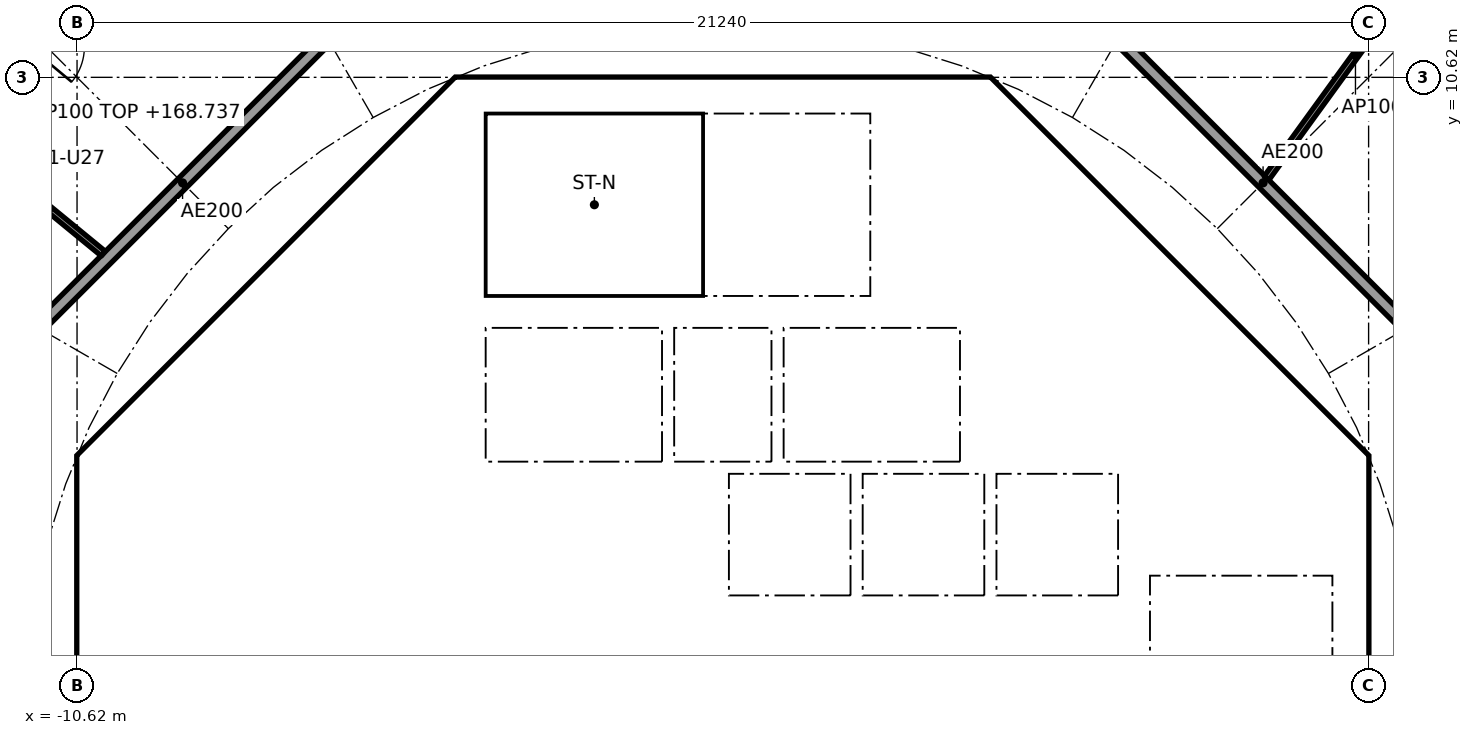
"""IFC4 building model, lengths in metres.
Left out: names, types, materials, properties, quantities, classifications, styles, units other than length and angle.
Written with IfcOpenShell. Run it as: python <this file> out.ifc"""

import sys

from ifc_helpers import new_model, si_unit, direction, frame, frame_2d, origin, place, context, subcontext, project, spatial, polyline, rectangle, outline, extrude, element, fill, save


model = new_model("IFC4")
c1 = context("Model", 3, precision=1e-05, world=origin(), true_north=direction((0.0, 1.0)))
c2 = subcontext(c1, "Body", "Model", "MODEL_VIEW")
j1 = project(units=[si_unit("LENGTHUNIT", "METRE"), si_unit("PLANEANGLEUNIT", "RADIAN")], contexts=[c1])
p1 = place(None, origin())
s1 = spatial("IfcSite", under=j1, at=p1, CompositionType="ELEMENT")
p2 = place(p1, origin())
s2 = spatial("IfcBuilding", under=s1, at=p2, CompositionType="ELEMENT")
p3 = place(p2, frame((0.0, 0.0, 165.9)))
s3 = spatial("IfcBuildingStorey", under=s2, at=p3, CompositionType="ELEMENT", Elevation=165.9)
p4 = place(p3, frame((9.988, 4.613, 0.0), z_axis=(0.0, 0.0, 1.0), x_axis=(-0.707106781187, 0.707106781187, 0.0)))
e1 = element("IfcWall", 1, at=p4, inside=s3, PredefinedType="SHEAR", context=c2, shape_type="SweptSolid", body=[
    extrude(rectangle(XDim=7.602, YDim=0.6, at=frame_2d((3.801, 0.0))), origin(), (0.0, 0.0, 1.0), 3.44),
])
p5 = place(p4, frame((3.201, 0.0, 0.0)))
e2 = element("IfcOpeningElement", 2, at=p5, cuts=e1, PredefinedType="OPENING", context=c2, shape_type="SweptSolid", body=[
    extrude(rectangle(XDim=1.2, YDim=2.1, at=frame_2d((0.6, 1.05))), frame((0.0, 0.31, 0.0), z_axis=(0.0, -1.0, 0.0), x_axis=(1.0, 0.0, 0.0)), (0.0, 0.0, 1.0), 0.62),
])
p6 = place(p3, frame((-4.613, 9.988, 0.0), z_axis=(0.0, 0.0, 1.0), x_axis=(-0.707106781187, -0.707106781187, 0.0)))
e3 = element("IfcWall", 3, at=p6, inside=s3, PredefinedType="SHEAR", context=c2, shape_type="SweptSolid", body=[
    extrude(rectangle(XDim=7.602, YDim=0.6, at=frame_2d((3.801, 0.0))), origin(), (0.0, 0.0, 1.0), 3.44),
])
p7 = place(p6, frame((0.351, 0.0, 0.0)))
e4 = element("IfcOpeningElement", 4, at=p7, cuts=e3, PredefinedType="OPENING", context=c2, shape_type="SweptSolid", body=[
    extrude(rectangle(XDim=1.1, YDim=2.1, at=frame_2d((0.55, 1.05))), frame((0.0, 0.31, 0.0), z_axis=(0.0, -1.0, 0.0), x_axis=(1.0, 0.0, 0.0)), (0.0, 0.0, 1.0), 0.62),
])
p8 = place(p3, frame((-10.325, 3.801, 0.0), z_axis=(0.0, 0.0, 1.0), x_axis=(0.0, -1.0, 0.0)))
e5 = element("IfcWall", 5, at=p8, inside=s3, PredefinedType="SHEAR", context=c2, shape_type="SweptSolid", body=[
    extrude(rectangle(XDim=7.602, YDim=0.6, at=frame_2d((3.801, 0.0))), origin(), (0.0, 0.0, 1.0), 3.44),
])
p9 = place(p8, frame((0.651, 0.0, 0.0)))
e6 = element("IfcOpeningElement", 6, at=p9, cuts=e5, PredefinedType="OPENING", context=c2, shape_type="SweptSolid", body=[
    extrude(rectangle(XDim=1.5, YDim=2.1, at=frame_2d((0.75, 1.05))), frame((0.0, 0.31, 0.0), z_axis=(0.0, -1.0, 0.0), x_axis=(1.0, 0.0, 0.0)), (0.0, 0.0, 1.0), 0.62),
])
p10 = place(p8, frame((5.451, 0.0, 0.0)))
e7 = element("IfcOpeningElement", 7, at=p10, cuts=e5, PredefinedType="OPENING", context=c2, shape_type="SweptSolid", body=[
    extrude(rectangle(XDim=1.5, YDim=2.1, at=frame_2d((0.75, 1.05))), frame((0.0, 0.31, 0.0), z_axis=(0.0, -1.0, 0.0), x_axis=(1.0, 0.0, 0.0)), (0.0, 0.0, 1.0), 0.62),
])
p11 = place(p3, frame((-5.8, 4.3, 0.0), z_axis=(0.0, 0.0, 1.0), x_axis=(0.0, 1.0, 0.0)))
e8 = element("IfcWall", 8, at=p11, inside=s3, PredefinedType="PARTITIONING", context=c2, shape_type="SweptSolid", body=[
    extrude(rectangle(XDim=3.927, YDim=0.15, at=frame_2d((1.963, 0.0))), origin(), (0.0, 0.0, 1.0), 3.44),
])
p12 = place(p11, frame((1.551, 0.0, 0.0)))
e9 = element("IfcOpeningElement", 9, at=p12, cuts=e8, PredefinedType="OPENING", context=c2, shape_type="SweptSolid", body=[
    extrude(rectangle(XDim=0.9, YDim=2.1, at=frame_2d((0.45, 1.05))), frame((0.0, 0.085, 0.0), z_axis=(0.0, -1.0, 0.0), x_axis=(1.0, 0.0, 0.0)), (0.0, 0.0, 1.0), 0.17),
])
p13 = place(p3, frame((4.0, 4.3, 0.0), z_axis=(0.0, 0.0, 1.0), x_axis=(0.0, 1.0, 0.0)))
e10 = element("IfcWall", 10, at=p13, inside=s3, PredefinedType="SOLIDWALL", context=c2, shape_type="SweptSolid", body=[
    extrude(rectangle(XDim=2.2, YDim=0.2, at=frame_2d((1.1, 0.0))), origin(), (0.0, 0.0, 1.0), 3.44),
])
p14 = place(p13, frame((0.55, 0.0, 0.0)))
e11 = element("IfcOpeningElement", 11, at=p14, cuts=e10, PredefinedType="OPENING", context=c2, shape_type="SweptSolid", body=[
    extrude(rectangle(XDim=1.1, YDim=2.1, at=frame_2d((0.55, 1.05))), frame((0.0, 0.11, 0.0), z_axis=(0.0, -1.0, 0.0), x_axis=(1.0, 0.0, 0.0)), (0.0, 0.0, 1.0), 0.22),
])
p15 = place(p3, frame((-4.0, 4.3, 0.0), z_axis=(0.0, 0.0, 1.0), x_axis=(0.0, 1.0, 0.0)))
e12 = element("IfcWall", 12, at=p15, inside=s3, PredefinedType="SOLIDWALL", context=c2, shape_type="SweptSolid", body=[
    extrude(rectangle(XDim=2.2, YDim=0.2, at=frame_2d((1.1, 0.0))), origin(), (0.0, 0.0, 1.0), 3.44),
])
p16 = place(p15, frame((0.55, 0.0, 0.0)))
e13 = element("IfcOpeningElement", 13, at=p16, cuts=e12, PredefinedType="OPENING", context=c2, shape_type="SweptSolid", body=[
    extrude(rectangle(XDim=1.1, YDim=2.1, at=frame_2d((0.55, 1.05))), frame((0.0, 0.11, 0.0), z_axis=(0.0, -1.0, 0.0), x_axis=(1.0, 0.0, 0.0)), (0.0, 0.0, 1.0), 0.22),
])
p17 = place(p3, frame((-6.7, 2.0, 0.0), z_axis=(0.0, 0.0, 1.0), x_axis=(1.0, 0.0, 0.0)))
e14 = element("IfcWall", 14, at=p17, inside=s3, PredefinedType="SOLIDWALL", context=c2, shape_type="SweptSolid", body=[
    extrude(rectangle(XDim=13.4, YDim=0.2, at=frame_2d((6.7, 0.0))), origin(), (0.0, 0.0, 1.0), 3.44),
])
p18 = place(p17, frame((7.25, 0.0, 0.0)))
e15 = element("IfcOpeningElement", 15, at=p18, cuts=e14, PredefinedType="OPENING", context=c2, shape_type="SweptSolid", body=[
    extrude(rectangle(XDim=1.1, YDim=2.1, at=frame_2d((0.55, 1.05))), frame((0.0, 0.11, 0.0), z_axis=(0.0, -1.0, 0.0), x_axis=(1.0, 0.0, 0.0)), (0.0, 0.0, 1.0), 0.22),
])
p19 = place(p17, frame((9.45, 0.0, 0.0)))
e16 = element("IfcOpeningElement", 16, at=p19, cuts=e14, PredefinedType="OPENING", context=c2, shape_type="SweptSolid", body=[
    extrude(rectangle(XDim=1.1, YDim=2.1, at=frame_2d((0.55, 1.05))), frame((0.0, 0.11, 0.0), z_axis=(0.0, -1.0, 0.0), x_axis=(1.0, 0.0, 0.0)), (0.0, 0.0, 1.0), 0.22),
])
p20 = place(p17, frame((2.95, 0.0, 0.0)))
e17 = element("IfcOpeningElement", 17, at=p20, cuts=e14, PredefinedType="OPENING", context=c2, shape_type="SweptSolid", body=[
    extrude(rectangle(XDim=0.9, YDim=2.1, at=frame_2d((0.45, 1.05))), frame((0.0, 0.11, 0.0), z_axis=(0.0, -1.0, 0.0), x_axis=(1.0, 0.0, 0.0)), (0.0, 0.0, 1.0), 0.22),
])
p21 = place(p3, frame((6.7, 4.0, 0.0), z_axis=(0.0, 0.0, 1.0), x_axis=(1.0, 0.0, 0.0)))
e18 = element("IfcWall", 18, at=p21, inside=s3, PredefinedType="SOLIDWALL", context=c2, shape_type="SweptSolid", body=[
    extrude(rectangle(XDim=3.325, YDim=0.2, at=frame_2d((1.662, 0.0))), origin(), (0.0, 0.0, 1.0), 3.44),
])
p22 = place(p21, frame((1.25, 0.0, 0.0)))
e19 = element("IfcOpeningElement", 19, at=p22, cuts=e18, PredefinedType="OPENING", context=c2, shape_type="SweptSolid", body=[
    extrude(rectangle(XDim=1.1, YDim=2.1, at=frame_2d((0.55, 1.05))), frame((0.0, 0.11, 0.0), z_axis=(0.0, -1.0, 0.0), x_axis=(1.0, 0.0, 0.0)), (0.0, 0.0, 1.0), 0.22),
])
p23 = place(p3, frame((4.0, 7.025, 0.0), z_axis=(0.0, 0.0, 1.0), x_axis=(0.0, 1.0, 0.0)))
e20 = element("IfcWall", 20, at=p23, inside=s3, PredefinedType="SOLIDWALL", context=c2, shape_type="SweptSolid", body=[
    extrude(rectangle(XDim=3.0, YDim=0.2, at=frame_2d((1.5, 0.0))), origin(), (0.0, 0.0, 1.0), 3.44),
])
p24 = place(p23, frame((0.925, 0.0, 0.0)))
e21 = element("IfcOpeningElement", 21, at=p24, cuts=e20, PredefinedType="OPENING", context=c2, shape_type="SweptSolid", body=[
    extrude(rectangle(XDim=1.1, YDim=2.1, at=frame_2d((0.55, 1.05))), frame((0.0, 0.11, 0.0), z_axis=(0.0, -1.0, 0.0), x_axis=(1.0, 0.0, 0.0)), (0.0, 0.0, 1.0), 0.22),
])
p25 = place(p3, origin())
e22 = element("IfcWall", 22, at=p25, inside=s3, PredefinedType="SHEAR", context=c2, shape_type="SweptSolid", body=[
    extrude(outline(polyline([(-10.2, 4.825), (-9.776, 4.401), (-10.025, 4.152), (-10.025, 3.801), (-10.625, 3.801), (-10.625, 4.401), (-10.2, 4.825)])), origin(), (0.0, 0.0, 1.0), 3.44),
])
p26 = place(p3, origin())
e23 = element("IfcWall", 23, at=p26, inside=s3, PredefinedType="SHEAR", context=c2, shape_type="SweptSolid", body=[
    extrude(outline(polyline([(-4.152, 10.025), (-4.401, 9.776), (-4.825, 10.2), (-4.401, 10.625), (4.401, 10.625), (4.825, 10.2), (4.401, 9.776), (4.152, 10.025), (-4.152, 10.025)])), origin(), (0.0, 0.0, 1.0), 3.44),
])
p27 = place(p3, origin())
e24 = element("IfcWall", 24, at=p27, inside=s3, PredefinedType="SHEAR", context=c2, shape_type="SweptSolid", body=[
    extrude(outline(polyline([(9.776, -4.401), (10.025, -4.152), (10.025, -3.801), (10.025, 4.152), (9.776, 4.401), (10.2, 4.825), (10.625, 4.401), (10.625, -4.401), (10.2, -4.825), (9.776, -4.401)])), origin(), (0.0, 0.0, 1.0), 3.44),
])
for number, where, z_axis, x_axis in (
    (25, (-0.9, 4.3, 0.0), (0.0, 0.0, 1.0), (0.0, 1.0, 0.0)),
    (26, (0.9, 4.3, 0.0), (0.0, 0.0, 1.0), (0.0, 1.0, 0.0)),
):
    element("IfcWall", number, at=place(p3, frame(where, z_axis=z_axis, x_axis=x_axis)), inside=s3, PredefinedType="SOLIDWALL", context=c2, shape_type="SweptSolid", body=[
        extrude(rectangle(XDim=2.2, YDim=0.2, at=frame_2d((1.1, 0.0))), origin(), (0.0, 0.0, 1.0), 3.44),
    ])
p28 = place(p3, origin())
e27 = element("IfcWall", 27, at=p28, inside=s3, PredefinedType="SOLIDWALL", context=c2, shape_type="SweptSolid", body=[
    extrude(outline(polyline([(-6.7, 4.3), (6.7, 4.3), (6.7, 2.1), (6.5, 2.1), (6.5, 4.1), (4.5, 4.1), (4.5, 2.1), (4.3, 2.1), (4.3, 4.1), (2.3, 4.1), (2.3, 2.1), (2.1, 2.1), (2.1, 4.1), (0.1, 4.1), (0.1, 2.1), (-0.1, 2.1), (-0.1, 4.1), (-6.5, 4.1), (-6.5, 2.1), (-6.7, 2.1), (-6.7, 4.3)])), origin(), (0.0, 0.0, 1.0), 3.44),
])
p29 = place(p3, frame((-10.025, 4.0, 0.0), z_axis=(0.0, 0.0, 1.0), x_axis=(1.0, 0.0, 0.0)))
e28 = element("IfcWall", 28, at=p29, inside=s3, PredefinedType="PARTITIONING", context=c2, shape_type="SweptSolid", body=[
    extrude(rectangle(XDim=3.325, YDim=0.2, at=frame_2d((1.662, 0.0))), origin(), (0.0, 0.0, 1.0), 3.44),
])
p30 = place(p3, origin())
e29 = element("IfcWall", 29, at=p30, inside=s3, PredefinedType="SOLIDWALL", context=c2, shape_type="SweptSolid", body=[
    extrude(outline(polyline([(-3.9, 7.025), (-4.1, 7.025), (-4.1, 10.025), (-3.9, 10.025), (-3.9, 7.025)])), origin(), (0.0, 0.0, 1.0), 3.44),
])
p31 = place(p3, origin())
e30 = element("IfcWall", 30, at=p31, inside=s3, PredefinedType="SOLIDWALL", context=c2, shape_type="SweptSolid", body=[
    extrude(outline(polyline([(4.1, 6.5), (-4.1, 6.5), (-4.1, 7.025), (4.1, 7.025), (4.1, 6.5)])), origin(), (0.0, 0.0, 1.0), 3.44),
])
p32 = place(p3, origin())
e31 = element("IfcWall", 31, at=p32, inside=s3, PredefinedType="SOLIDWALL", context=c2, shape_type="SweptSolid", body=[
    extrude(outline(polyline([(7.025, -3.9), (6.7, -3.9), (6.7, 3.9), (7.025, 3.9), (7.025, -3.9)])), origin(), (0.0, 0.0, 1.0), 3.44),
])
p33 = place(p3, frame((12.635, 5.134, 0.0), z_axis=(0.0, 0.0, 1.0), x_axis=(-0.707106781187, 0.707106781187, 0.0)))
e32 = element("IfcWall", 32, at=p33, inside=s3, PredefinedType="PARTITIONING", context=c2, shape_type="SweptSolid", body=[
    extrude(rectangle(XDim=10.609, YDim=0.2, at=frame_2d((5.305, 0.0))), origin(), (0.0, 0.0, 1.0), 3.44),
])
p34 = place(p3, frame((-5.275, 12.494, 0.0), z_axis=(0.0, 0.0, 1.0), x_axis=(-0.707106781187, -0.707106781187, 0.0)))
e33 = element("IfcWall", 33, at=p34, inside=s3, PredefinedType="PARTITIONING", context=c2, shape_type="SweptSolid", body=[
    extrude(rectangle(XDim=10.209, YDim=0.2, at=frame_2d((5.104, 0.0))), origin(), (0.0, 0.0, 1.0), 3.44),
])
p35 = place(p3, frame((8.943, 8.966, 0.0), z_axis=(0.0, 0.0, 1.0), x_axis=(0.587187896734, 0.809450661825, 0.0)))
e34 = element("IfcWall", 34, at=p35, inside=s3, PredefinedType="PARTITIONING", context=c2, shape_type="SweptSolid", body=[
    extrude(rectangle(XDim=4.975, YDim=0.1, at=frame_2d((2.487, 0.0))), origin(), (0.0, 0.0, 1.0), 2.756),
])
p36 = place(p3, frame((-9.631, 13.242, 0.0), z_axis=(0.0, 0.0, 1.0), x_axis=(-0.640315711982, -0.768111833647, 0.0)))
e35 = element("IfcWall", 35, at=p36, inside=s3, PredefinedType="PARTITIONING", context=c2, shape_type="SweptSolid", body=[
    extrude(rectangle(XDim=4.572, YDim=0.1, at=frame_2d((2.286, 0.0))), origin(), (0.0, 0.0, 1.0), 2.837),
])
p37 = place(p36, frame((1.861, 0.0, 0.0)))
e36 = element("IfcOpeningElement", 36, at=p37, cuts=e35, PredefinedType="OPENING", context=c2, shape_type="SweptSolid", body=[
    extrude(rectangle(XDim=0.9, YDim=2.1, at=frame_2d((0.45, 1.05))), frame((0.0, 0.06, 0.0), z_axis=(0.0, -1.0, 0.0), x_axis=(1.0, 0.0, 0.0)), (0.0, 0.0, 1.0), 0.12),
])
p38 = place(p3, frame((-10.189, 7.721, 0.0), z_axis=(0.0, 0.0, 1.0), x_axis=(-0.773134429339, 0.634242188892, 0.0)))
e37 = element("IfcWall", 37, at=p38, inside=s3, PredefinedType="PARTITIONING", context=c2, shape_type="SweptSolid", body=[
    extrude(rectangle(XDim=9.552, YDim=0.1, at=frame_2d((4.776, 0.0))), origin(), (0.0, 0.0, 1.0), 2.756),
])
p39 = place(p38, frame((7.59, 0.0, 0.0)))
e38 = element("IfcOpeningElement", 38, at=p39, cuts=e37, PredefinedType="OPENING", context=c2, shape_type="SweptSolid", body=[
    extrude(rectangle(XDim=0.9, YDim=2.1, at=frame_2d((0.45, 1.05))), frame((0.0, 0.06, 0.0), z_axis=(0.0, -1.0, 0.0), x_axis=(1.0, 0.0, 0.0)), (0.0, 0.0, 1.0), 0.12),
])
p40 = place(p38, frame((1.104, 0.0, 0.0)))
e39 = element("IfcOpeningElement", 39, at=p40, cuts=e37, PredefinedType="OPENING", context=c2, shape_type="SweptSolid", body=[
    extrude(rectangle(XDim=0.9, YDim=2.1, at=frame_2d((0.45, 1.05))), frame((0.0, 0.06, 0.0), z_axis=(0.0, -1.0, 0.0), x_axis=(1.0, 0.0, 0.0)), (0.0, 0.0, 1.0), 0.12),
])
p41 = place(p18, origin())
e40 = element("IfcDoor", 40, at=p41, inside=s3, OperationType="DOUBLE_DOOR_SLIDING", PredefinedType="DOOR", context=c2, shape_type="SweptSolid", body=[
    extrude(rectangle(XDim=1.1, YDim=2.1, at=frame_2d((0.55, 1.05))), frame((0.0, 0.025, 0.0), z_axis=(0.0, -1.0, 0.0), x_axis=(1.0, 0.0, 0.0)), (0.0, 0.0, 1.0), 0.05),
])
fill(e15, e40)
p42 = place(p19, origin())
e41 = element("IfcDoor", 41, at=p42, inside=s3, OperationType="DOUBLE_DOOR_SLIDING", PredefinedType="DOOR", context=c2, shape_type="SweptSolid", body=[
    extrude(rectangle(XDim=1.1, YDim=2.1, at=frame_2d((0.55, 1.05))), frame((0.0, 0.025, 0.0), z_axis=(0.0, -1.0, 0.0), x_axis=(1.0, 0.0, 0.0)), (0.0, 0.0, 1.0), 0.05),
])
fill(e16, e41)
p43 = place(p14, origin())
e42 = element("IfcDoor", 42, at=p43, inside=s3, OperationType="DOUBLE_DOOR_SLIDING", PredefinedType="DOOR", context=c2, shape_type="SweptSolid", body=[
    extrude(rectangle(XDim=1.1, YDim=2.1, at=frame_2d((0.55, 1.05))), frame((0.0, 0.025, 0.0), z_axis=(0.0, -1.0, 0.0), x_axis=(1.0, 0.0, 0.0)), (0.0, 0.0, 1.0), 0.05),
])
fill(e11, e42)
p44 = place(p16, origin())
e43 = element("IfcDoor", 43, at=p44, inside=s3, OperationType="DOUBLE_DOOR_SLIDING", PredefinedType="DOOR", context=c2, shape_type="SweptSolid", body=[
    extrude(rectangle(XDim=1.1, YDim=2.1, at=frame_2d((0.55, 1.05))), frame((0.0, 0.025, 0.0), z_axis=(0.0, -1.0, 0.0), x_axis=(1.0, 0.0, 0.0)), (0.0, 0.0, 1.0), 0.05),
])
fill(e13, e43)
p45 = place(p22, frame((1.1, 0.0, 0.0), x_axis=(-1.0, 0.0, 0.0)))
e44 = element("IfcDoor", 44, at=p45, inside=s3, OperationType="SINGLE_SWING_RIGHT", PredefinedType="DOOR", context=c2, shape_type="SweptSolid", body=[
    extrude(rectangle(XDim=1.1, YDim=2.1, at=frame_2d((0.55, 1.05))), frame((0.0, 0.025, 0.0), z_axis=(0.0, -1.0, 0.0), x_axis=(1.0, 0.0, 0.0)), (0.0, 0.0, 1.0), 0.05),
])
fill(e19, e44)
p46 = place(p24, origin())
e45 = element("IfcDoor", 45, at=p46, inside=s3, OperationType="SINGLE_SWING_LEFT", PredefinedType="DOOR", context=c2, shape_type="SweptSolid", body=[
    extrude(rectangle(XDim=1.1, YDim=2.1, at=frame_2d((0.55, 1.05))), frame((0.0, 0.025, 0.0), z_axis=(0.0, -1.0, 0.0), x_axis=(1.0, 0.0, 0.0)), (0.0, 0.0, 1.0), 0.05),
])
fill(e21, e45)
p47 = place(p12, origin())
e46 = element("IfcDoor", 46, at=p47, inside=s3, OperationType="SINGLE_SWING_RIGHT", PredefinedType="DOOR", context=c2, shape_type="SweptSolid", body=[
    extrude(rectangle(XDim=0.9, YDim=2.1, at=frame_2d((0.45, 1.05))), frame((0.0, 0.025, 0.0), z_axis=(0.0, -1.0, 0.0), x_axis=(1.0, 0.0, 0.0)), (0.0, 0.0, 1.0), 0.05),
])
fill(e9, e46)
p48 = place(p20, origin())
e47 = element("IfcDoor", 47, at=p48, inside=s3, OperationType="SINGLE_SWING_LEFT", PredefinedType="DOOR", context=c2, shape_type="SweptSolid", body=[
    extrude(rectangle(XDim=0.9, YDim=2.1, at=frame_2d((0.45, 1.05))), frame((0.0, 0.025, 0.0), z_axis=(0.0, -1.0, 0.0), x_axis=(1.0, 0.0, 0.0)), (0.0, 0.0, 1.0), 0.05),
])
fill(e17, e47)
p49 = place(p5, origin())
e48 = element("IfcDoor", 48, at=p49, inside=s3, OperationType="SINGLE_SWING_LEFT", PredefinedType="DOOR", context=c2, shape_type="SweptSolid", body=[
    extrude(rectangle(XDim=1.2, YDim=2.1, at=frame_2d((0.6, 1.05))), frame((0.0, 0.025, 0.0), z_axis=(0.0, -1.0, 0.0), x_axis=(1.0, 0.0, 0.0)), (0.0, 0.0, 1.0), 0.05),
])
fill(e2, e48)
p50 = place(p9, origin())
e49 = element("IfcDoor", 49, at=p50, inside=s3, OperationType="DOUBLE_DOOR_SINGLE_SWING", PredefinedType="DOOR", context=c2, shape_type="SweptSolid", body=[
    extrude(rectangle(XDim=1.5, YDim=2.1, at=frame_2d((0.75, 1.05))), frame((0.0, 0.025, 0.0), z_axis=(0.0, -1.0, 0.0), x_axis=(1.0, 0.0, 0.0)), (0.0, 0.0, 1.0), 0.05),
])
fill(e6, e49)
p51 = place(p7, origin())
e50 = element("IfcDoor", 50, at=p51, inside=s3, OperationType="SINGLE_SWING_LEFT", PredefinedType="DOOR", context=c2, shape_type="SweptSolid", body=[
    extrude(rectangle(XDim=1.1, YDim=2.1, at=frame_2d((0.55, 1.05))), frame((0.0, 0.025, 0.0), z_axis=(0.0, -1.0, 0.0), x_axis=(1.0, 0.0, 0.0)), (0.0, 0.0, 1.0), 0.05),
])
fill(e4, e50)
save(model, sys.argv[1])
